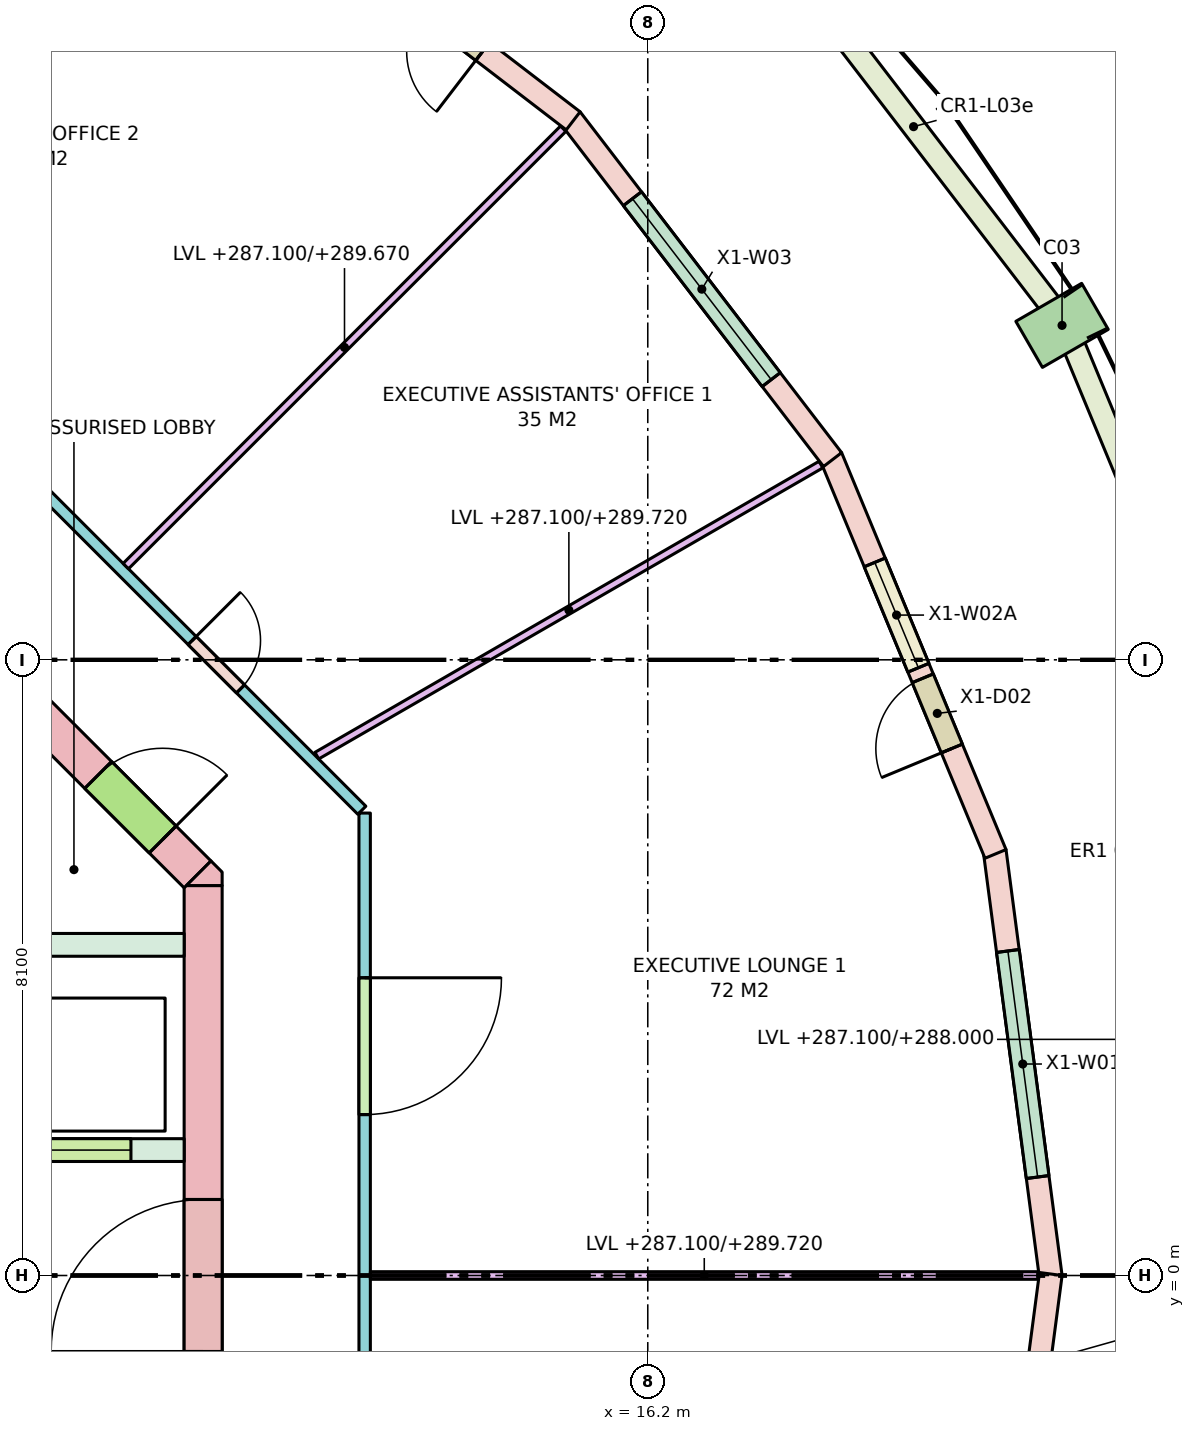
"""IFC4 building model, lengths in metres.
Left out: names, types, materials, properties, quantities, classifications, styles, units other than length and angle.
Written with IfcOpenShell. Run it as: python <this file> out.ifc"""

import sys

from ifc_helpers import new_model, si_unit, direction, frame, frame_2d, origin, origin_2d, place, context, subcontext, project, spatial, polyline, rectangle, outline, extrude, element, fill, save


model = new_model("IFC4")
c1 = context("Model", 3, precision=1e-05, world=origin(), true_north=direction((0.0, 1.0)))
c2 = subcontext(c1, "Body", "Model", "MODEL_VIEW")
j1 = project(units=[si_unit("LENGTHUNIT", "METRE"), si_unit("PLANEANGLEUNIT", "RADIAN")], contexts=[c1])
p1 = place(None, origin())
s1 = spatial("IfcSite", under=j1, at=p1, CompositionType="ELEMENT")
p2 = place(p1, origin())
s2 = spatial("IfcBuilding", under=s1, at=p2, CompositionType="ELEMENT")
p3 = place(p2, frame((0.0, 0.0, 287.1)))
s3 = spatial("IfcBuildingStorey", under=s2, at=p3, CompositionType="ELEMENT", Elevation=287.1)
p4 = place(p3, frame((21.651, 12.5, 0.0), z_axis=(0.0, 0.0, 1.0), x_axis=(-0.5, 0.866025403784, 0.0)))
e1 = element("IfcColumn", 1, at=p4, inside=s3, PredefinedType="COLUMN", context=c2, shape_type="SweptSolid", body=[
    extrude(rectangle(XDim=0.7, YDim=1.0, at=origin_2d()), origin(), (0.0, 0.0, 1.0), 3.7),
])
p5 = place(p3, frame((10.35, -5.13, -0.28), z_axis=(0.0, 0.0, 1.0), x_axis=(0.0, 1.0, 0.0)))
e2 = element("IfcWall", 2, at=p5, inside=s3, PredefinedType="SHEAR", context=c2, shape_type="SweptSolid", body=[
    extrude(rectangle(XDim=10.26, YDim=0.5, at=frame_2d((5.13, 0.0))), origin(), (0.0, 0.0, 1.0), 3.7),
])
p6 = place(p5, frame((4.13, 0.0, 0.28)))
e3 = element("IfcOpeningElement", 3, at=p6, cuts=e2, PredefinedType="OPENING", context=c2, shape_type="SweptSolid", body=[
    extrude(rectangle(XDim=2.0, YDim=2.1, at=frame_2d((1.0, 1.05))), frame((0.0, 0.26, 0.0), z_axis=(0.0, -1.0, 0.0), x_axis=(1.0, 0.0, 0.0)), (0.0, 0.0, 1.0), 0.52),
])
p7 = place(p3, frame((7.277, 8.277, -0.28), z_axis=(0.0, 0.0, 1.0), x_axis=(0.707106781187, -0.707106781187, 0.0)))
e4 = element("IfcWall", 4, at=p7, inside=s3, PredefinedType="SHEAR", context=c2, shape_type="SweptSolid", body=[
    extrude(rectangle(XDim=4.243, YDim=0.5, at=frame_2d((2.121, 0.0))), origin(), (0.0, 0.0, 1.0), 3.7),
])
p8 = place(p7, frame((2.393, 0.0, 0.28)))
e5 = element("IfcOpeningElement", 5, at=p8, cuts=e4, PredefinedType="OPENING", context=c2, shape_type="SweptSolid", body=[
    extrude(rectangle(XDim=1.2, YDim=2.1, at=frame_2d((0.6, 1.05))), frame((0.0, 0.26, 0.0), z_axis=(0.0, -1.0, 0.0), x_axis=(1.0, 0.0, 0.0)), (0.0, 0.0, 1.0), 0.52),
])
p9 = place(p3, frame((0.0, 0.0, -0.28)))
e6 = element("IfcWall", 6, at=p9, inside=s3, PredefinedType="SHEAR", context=c2, shape_type="SweptSolid", body=[
    extrude(outline(polyline([(10.6, 5.307), (10.6, 5.13), (10.13, 5.13), (10.454, 5.454), (10.6, 5.307)])), origin(), (0.0, 0.0, 1.0), 3.7),
])
p10 = place(p3, frame((2.0, 4.35, 0.0), z_axis=(0.0, 0.0, 1.0), x_axis=(1.0, 0.0, 0.0)))
e7 = element("IfcWall", 7, at=p10, inside=s3, PredefinedType="SOLIDWALL", context=c2, shape_type="SweptSolid", body=[
    extrude(rectangle(XDim=8.1, YDim=0.3, at=frame_2d((4.05, 0.0))), origin(), (0.0, 0.0, 1.0), 3.42),
])
p11 = place(p3, frame((2.0, 1.65, 0.0), z_axis=(0.0, 0.0, 1.0), x_axis=(1.0, 0.0, 0.0)))
e8 = element("IfcWall", 8, at=p11, inside=s3, PredefinedType="SOLIDWALL", context=c2, shape_type="SweptSolid", body=[
    extrude(rectangle(XDim=8.1, YDim=0.3, at=frame_2d((4.05, 0.0))), origin(), (0.0, 0.0, 1.0), 3.42),
])
p12 = place(p11, frame((0.85, 0.0, 0.0)))
e9 = element("IfcOpeningElement", 9, at=p12, cuts=e8, PredefinedType="OPENING", context=c2, shape_type="SweptSolid", body=[
    extrude(rectangle(XDim=1.1, YDim=2.1, at=frame_2d((0.55, 1.05))), frame((0.0, 0.16, 0.0), z_axis=(0.0, -1.0, 0.0), x_axis=(1.0, 0.0, 0.0)), (0.0, 0.0, 1.0), 0.32),
])
p13 = place(p11, frame((3.5, 0.0, 0.0)))
e10 = element("IfcOpeningElement", 10, at=p13, cuts=e8, PredefinedType="OPENING", context=c2, shape_type="SweptSolid", body=[
    extrude(rectangle(XDim=1.1, YDim=2.1, at=frame_2d((0.55, 1.05))), frame((0.0, 0.16, 0.0), z_axis=(0.0, -1.0, 0.0), x_axis=(1.0, 0.0, 0.0)), (0.0, 0.0, 1.0), 0.32),
])
p14 = place(p11, frame((6.3, 0.0, 0.0)))
e11 = element("IfcOpeningElement", 11, at=p14, cuts=e8, PredefinedType="OPENING", context=c2, shape_type="SweptSolid", body=[
    extrude(rectangle(XDim=1.1, YDim=2.1, at=frame_2d((0.55, 1.05))), frame((0.0, 0.16, 0.0), z_axis=(0.0, -1.0, 0.0), x_axis=(1.0, 0.0, 0.0)), (0.0, 0.0, 1.0), 0.32),
])
p15 = place(p3, frame((21.503, -0.02, 0.0), z_axis=(0.0, 0.0, 1.0), x_axis=(-0.130533844229, 0.991443853938, 0.0)))
e12 = element("IfcWall", 12, at=p15, inside=s3, PredefinedType="STANDARD", context=c2, shape_type="SweptSolid", body=[
    extrude(rectangle(XDim=5.652, YDim=0.3, at=frame_2d((2.826, 0.0))), origin(), (0.0, 0.0, 1.0), 3.42),
])
p16 = place(p15, frame((1.326, 0.0, 0.8)))
e13 = element("IfcOpeningElement", 13, at=p16, cuts=e12, PredefinedType="OPENING", context=c2, shape_type="SweptSolid", body=[
    extrude(rectangle(XDim=3.0, YDim=2.4, at=frame_2d((1.5, 1.2))), frame((0.0, 0.16, 0.0), z_axis=(0.0, -1.0, 0.0), x_axis=(1.0, 0.0, 0.0)), (0.0, 0.0, 1.0), 0.32),
])
p17 = place(p3, frame((20.775, 5.546, 0.0), z_axis=(0.0, 0.0, 1.0), x_axis=(-0.382660798975, 0.923888907244, 0.0)))
e14 = element("IfcWall", 14, at=p17, inside=s3, PredefinedType="STANDARD", context=c2, shape_type="SweptSolid", body=[
    extrude(rectangle(XDim=5.652, YDim=0.3, at=frame_2d((2.826, 0.0))), origin(), (0.0, 0.0, 1.0), 3.42),
])
p18 = place(p17, frame((1.501, 0.0, 0.0)))
e15 = element("IfcOpeningElement", 15, at=p18, cuts=e14, PredefinedType="OPENING", context=c2, shape_type="SweptSolid", body=[
    extrude(rectangle(XDim=1.0, YDim=2.4, at=frame_2d((0.5, 1.2))), frame((0.0, 0.16, 0.0), z_axis=(0.0, -1.0, 0.0), x_axis=(1.0, 0.0, 0.0)), (0.0, 0.0, 1.0), 0.32),
])
p19 = place(p17, frame((2.651, 0.0, 0.8)))
e16 = element("IfcOpeningElement", 16, at=p19, cuts=e14, PredefinedType="OPENING", context=c2, shape_type="SweptSolid", body=[
    extrude(rectangle(XDim=1.5, YDim=2.4, at=frame_2d((0.75, 1.2))), frame((0.0, 0.16, 0.0), z_axis=(0.0, -1.0, 0.0), x_axis=(1.0, 0.0, 0.0)), (0.0, 0.0, 1.0), 0.32),
])
p20 = place(p3, frame((18.632, 10.734, 0.0), z_axis=(0.0, 0.0, 1.0), x_axis=(-0.608747976925, 0.793363662257, 0.0)))
e17 = element("IfcWall", 17, at=p20, inside=s3, PredefinedType="STANDARD", context=c2, shape_type="SweptSolid", body=[
    extrude(rectangle(XDim=5.652, YDim=0.3, at=frame_2d((2.826, 0.0))), origin(), (0.0, 0.0, 1.0), 3.42),
])
p21 = place(p20, frame((1.326, 0.0, 0.8)))
e18 = element("IfcOpeningElement", 18, at=p21, cuts=e17, PredefinedType="OPENING", context=c2, shape_type="SweptSolid", body=[
    extrude(rectangle(XDim=3.0, YDim=2.4, at=frame_2d((1.5, 1.2))), frame((0.0, 0.16, 0.0), z_axis=(0.0, -1.0, 0.0), x_axis=(1.0, 0.0, 0.0)), (0.0, 0.0, 1.0), 0.32),
])
p22 = place(p3, frame((15.219, 15.191, 0.0), z_axis=(0.0, 0.0, 1.0), x_axis=(-0.793363662257, 0.608747976925, 0.0)))
e19 = element("IfcWall", 19, at=p22, inside=s3, PredefinedType="STANDARD", context=c2, shape_type="SweptSolid", body=[
    extrude(rectangle(XDim=5.652, YDim=0.3, at=frame_2d((2.826, 0.0))), origin(), (0.0, 0.0, 1.0), 3.42),
])
p23 = place(p22, frame((1.501, 0.0, 0.0)))
e20 = element("IfcOpeningElement", 20, at=p23, cuts=e19, PredefinedType="OPENING", context=c2, shape_type="SweptSolid", body=[
    extrude(rectangle(XDim=1.0, YDim=2.4, at=frame_2d((0.5, 1.2))), frame((0.0, 0.16, 0.0), z_axis=(0.0, -1.0, 0.0), x_axis=(1.0, 0.0, 0.0)), (0.0, 0.0, 1.0), 0.32),
])
p24 = place(p22, frame((2.651, 0.0, 0.8)))
e21 = element("IfcOpeningElement", 21, at=p24, cuts=e19, PredefinedType="OPENING", context=c2, shape_type="SweptSolid", body=[
    extrude(rectangle(XDim=1.5, YDim=2.4, at=frame_2d((0.75, 1.2))), frame((0.0, 0.16, 0.0), z_axis=(0.0, -1.0, 0.0), x_axis=(1.0, 0.0, 0.0)), (0.0, 0.0, 1.0), 0.32),
])
p25 = place(p3, frame((20.765, -5.584, 0.0), z_axis=(0.0, 0.0, 1.0), x_axis=(0.130533844229, 0.991443853938, 0.0)))
e22 = element("IfcWall", 22, at=p25, inside=s3, PredefinedType="STANDARD", context=c2, shape_type="SweptSolid", body=[
    extrude(rectangle(XDim=5.652, YDim=0.3, at=frame_2d((2.826, 0.0))), origin(), (0.0, 0.0, 1.0), 3.42),
])
p26 = place(p25, frame((1.501, 0.0, 0.0)))
e23 = element("IfcOpeningElement", 23, at=p26, cuts=e22, PredefinedType="OPENING", context=c2, shape_type="SweptSolid", body=[
    extrude(rectangle(XDim=1.0, YDim=2.4, at=frame_2d((0.5, 1.2))), frame((0.0, 0.16, 0.0), z_axis=(0.0, -1.0, 0.0), x_axis=(1.0, 0.0, 0.0)), (0.0, 0.0, 1.0), 0.32),
])
p27 = place(p25, frame((2.651, 0.0, 0.8)))
e24 = element("IfcOpeningElement", 24, at=p27, cuts=e22, PredefinedType="OPENING", context=c2, shape_type="SweptSolid", body=[
    extrude(rectangle(XDim=1.5, YDim=2.4, at=frame_2d((0.75, 1.2))), frame((0.0, 0.16, 0.0), z_axis=(0.0, -1.0, 0.0), x_axis=(1.0, 0.0, 0.0)), (0.0, 0.0, 1.0), 0.32),
])
p28 = place(p3, frame((8.121, 10.438, 0.0), z_axis=(0.0, 0.0, 1.0), x_axis=(0.707106781187, -0.707106781187, 0.0)))
e25 = element("IfcWall", 25, at=p28, inside=s3, PredefinedType="PARTITIONING", context=c2, shape_type="SweptSolid", body=[
    extrude(rectangle(XDim=6.105, YDim=0.15, at=frame_2d((3.053, 0.0))), origin(), (0.0, 0.0, 1.0), 2.57),
])
p29 = place(p28, frame((2.948, 0.0, 0.0)))
e26 = element("IfcOpeningElement", 26, at=p29, cuts=e25, PredefinedType="OPENING", context=c2, shape_type="SweptSolid", body=[
    extrude(rectangle(XDim=0.9, YDim=2.1, at=frame_2d((0.45, 1.05))), frame((0.0, 0.085, 0.0), z_axis=(0.0, -1.0, 0.0), x_axis=(1.0, 0.0, 0.0)), (0.0, 0.0, 1.0), 0.17),
])
p30 = place(p3, frame((12.475, 6.084, 0.0), z_axis=(0.0, 0.0, 1.0), x_axis=(0.0, -1.0, 0.0)))
e27 = element("IfcWall", 27, at=p30, inside=s3, PredefinedType="PARTITIONING", context=c2, shape_type="SweptSolid", body=[
    extrude(rectangle(XDim=12.167, YDim=0.15, at=frame_2d((6.084, 0.0))), origin(), (0.0, 0.0, 1.0), 2.92),
])
p31 = place(p30, frame((8.601, 0.0, 0.0)))
e28 = element("IfcOpeningElement", 28, at=p31, cuts=e27, PredefinedType="OPENING", context=c2, shape_type="SweptSolid", body=[
    extrude(rectangle(XDim=1.0, YDim=2.1, at=frame_2d((0.5, 1.05))), frame((0.0, 0.085, 0.0), z_axis=(0.0, -1.0, 0.0), x_axis=(1.0, 0.0, 0.0)), (0.0, 0.0, 1.0), 0.17),
])
p32 = place(p30, frame((2.167, 0.0, 0.0)))
e29 = element("IfcOpeningElement", 29, at=p32, cuts=e27, PredefinedType="OPENING", context=c2, shape_type="SweptSolid", body=[
    extrude(rectangle(XDim=1.8, YDim=2.1, at=frame_2d((0.9, 1.05))), frame((0.0, 0.085, 0.0), z_axis=(0.0, -1.0, 0.0), x_axis=(1.0, 0.0, 0.0)), (0.0, 0.0, 1.0), 0.17),
])
p33 = place(p3, frame((12.55, 0.0, 0.0), z_axis=(0.0, 0.0, 1.0), x_axis=(1.0, 0.0, 0.0)))
e30 = element("IfcWall", 30, at=p33, inside=s3, PredefinedType="PARTITIONING", context=c2, shape_type="SweptSolid", body=[
    extrude(rectangle(XDim=8.787, YDim=0.1, at=frame_2d((4.393, 0.0))), origin(), (0.0, 0.0, 1.0), 2.62),
])
p34 = place(p3, frame((11.846, 6.839, 0.0), z_axis=(0.0, 0.0, 1.0), x_axis=(0.866007734672, 0.500030602552, 0.0)))
e31 = element("IfcWall", 31, at=p34, inside=s3, PredefinedType="PARTITIONING", context=c2, shape_type="SweptSolid", body=[
    extrude(rectangle(XDim=7.658, YDim=0.1, at=frame_2d((3.829, 0.0))), origin(), (0.0, 0.0, 1.0), 2.62),
])
p35 = place(p3, frame((9.333, 9.333, 0.0), z_axis=(0.0, 0.0, 1.0), x_axis=(0.707106781187, 0.707106781187, 0.0)))
e32 = element("IfcWall", 32, at=p35, inside=s3, PredefinedType="PARTITIONING", context=c2, shape_type="SweptSolid", body=[
    extrude(rectangle(XDim=8.139, YDim=0.1, at=frame_2d((4.069, 0.0))), origin(), (0.0, 0.0, 1.0), 2.57),
])
p36 = place(p16, origin())
e33 = element("IfcWindow", 33, at=p36, inside=s3, PartitioningType="SINGLE_PANEL", PredefinedType="WINDOW", context=c2, shape_type="SweptSolid", body=[
    extrude(rectangle(XDim=3.0, YDim=2.4, at=frame_2d((1.5, 1.2))), frame((0.0, 0.03, 0.0), z_axis=(0.0, -1.0, 0.0), x_axis=(1.0, 0.0, 0.0)), (0.0, 0.0, 1.0), 0.06),
])
fill(e13, e33)
p37 = place(p18, origin())
e34 = element("IfcDoor", 34, at=p37, inside=s3, OperationType="SINGLE_SWING_LEFT", PredefinedType="DOOR", context=c2, shape_type="SweptSolid", body=[
    extrude(rectangle(XDim=1.0, YDim=2.4, at=frame_2d((0.5, 1.2))), frame((0.0, 0.025, 0.0), z_axis=(0.0, -1.0, 0.0), x_axis=(1.0, 0.0, 0.0)), (0.0, 0.0, 1.0), 0.05),
])
fill(e15, e34)
p38 = place(p19, origin())
e35 = element("IfcWindow", 35, at=p38, inside=s3, PartitioningType="SINGLE_PANEL", PredefinedType="WINDOW", context=c2, shape_type="SweptSolid", body=[
    extrude(rectangle(XDim=1.5, YDim=2.4, at=frame_2d((0.75, 1.2))), frame((0.0, 0.03, 0.0), z_axis=(0.0, -1.0, 0.0), x_axis=(1.0, 0.0, 0.0)), (0.0, 0.0, 1.0), 0.06),
])
fill(e16, e35)
p39 = place(p21, origin())
e36 = element("IfcWindow", 36, at=p39, inside=s3, PartitioningType="SINGLE_PANEL", PredefinedType="WINDOW", context=c2, shape_type="SweptSolid", body=[
    extrude(rectangle(XDim=3.0, YDim=2.4, at=frame_2d((1.5, 1.2))), frame((0.0, 0.03, 0.0), z_axis=(0.0, -1.0, 0.0), x_axis=(1.0, 0.0, 0.0)), (0.0, 0.0, 1.0), 0.06),
])
fill(e18, e36)
p40 = place(p23, origin())
e37 = element("IfcDoor", 37, at=p40, inside=s3, OperationType="SINGLE_SWING_LEFT", PredefinedType="DOOR", context=c2, shape_type="SweptSolid", body=[
    extrude(rectangle(XDim=1.0, YDim=2.4, at=frame_2d((0.5, 1.2))), frame((0.0, 0.025, 0.0), z_axis=(0.0, -1.0, 0.0), x_axis=(1.0, 0.0, 0.0)), (0.0, 0.0, 1.0), 0.05),
])
fill(e20, e37)
p41 = place(p14, origin())
e38 = element("IfcDoor", 38, at=p41, inside=s3, OperationType="DOUBLE_DOOR_SLIDING", PredefinedType="DOOR", context=c2, shape_type="SweptSolid", body=[
    extrude(rectangle(XDim=1.1, YDim=2.1, at=frame_2d((0.55, 1.05))), frame((0.0, 0.025, 0.0), z_axis=(0.0, -1.0, 0.0), x_axis=(1.0, 0.0, 0.0)), (0.0, 0.0, 1.0), 0.05),
])
fill(e11, e38)
p42 = place(p8, origin())
e39 = element("IfcDoor", 39, at=p42, inside=s3, OperationType="SINGLE_SWING_RIGHT", PredefinedType="DOOR", context=c2, shape_type="SweptSolid", body=[
    extrude(rectangle(XDim=1.2, YDim=2.1, at=frame_2d((0.6, 1.05))), frame((0.0, 0.025, 0.0), z_axis=(0.0, -1.0, 0.0), x_axis=(1.0, 0.0, 0.0)), (0.0, 0.0, 1.0), 0.05),
])
fill(e5, e39)
p43 = place(p6, origin())
e40 = element("IfcDoor", 40, at=p43, inside=s3, OperationType="DOUBLE_DOOR_SINGLE_SWING", PredefinedType="DOOR", context=c2, shape_type="SweptSolid", body=[
    extrude(rectangle(XDim=2.0, YDim=2.1, at=frame_2d((1.0, 1.05))), frame((0.0, 0.025, 0.0), z_axis=(0.0, -1.0, 0.0), x_axis=(1.0, 0.0, 0.0)), (0.0, 0.0, 1.0), 0.05),
])
fill(e3, e40)
p44 = place(p32, origin())
e41 = element("IfcDoor", 41, at=p44, inside=s3, OperationType="DOUBLE_DOOR_SINGLE_SWING", PredefinedType="DOOR", context=c2, shape_type="SweptSolid", body=[
    extrude(rectangle(XDim=1.8, YDim=2.1, at=frame_2d((0.9, 1.05))), frame((0.0, 0.025, 0.0), z_axis=(0.0, -1.0, 0.0), x_axis=(1.0, 0.0, 0.0)), (0.0, 0.0, 1.0), 0.05),
])
fill(e29, e41)
p45 = place(p29, origin())
e42 = element("IfcDoor", 42, at=p45, inside=s3, OperationType="SINGLE_SWING_LEFT", PredefinedType="DOOR", context=c2, shape_type="SweptSolid", body=[
    extrude(rectangle(XDim=0.9, YDim=2.1, at=frame_2d((0.45, 1.05))), frame((0.0, 0.025, 0.0), z_axis=(0.0, -1.0, 0.0), x_axis=(1.0, 0.0, 0.0)), (0.0, 0.0, 1.0), 0.05),
])
fill(e26, e42)
save(model, sys.argv[1])
